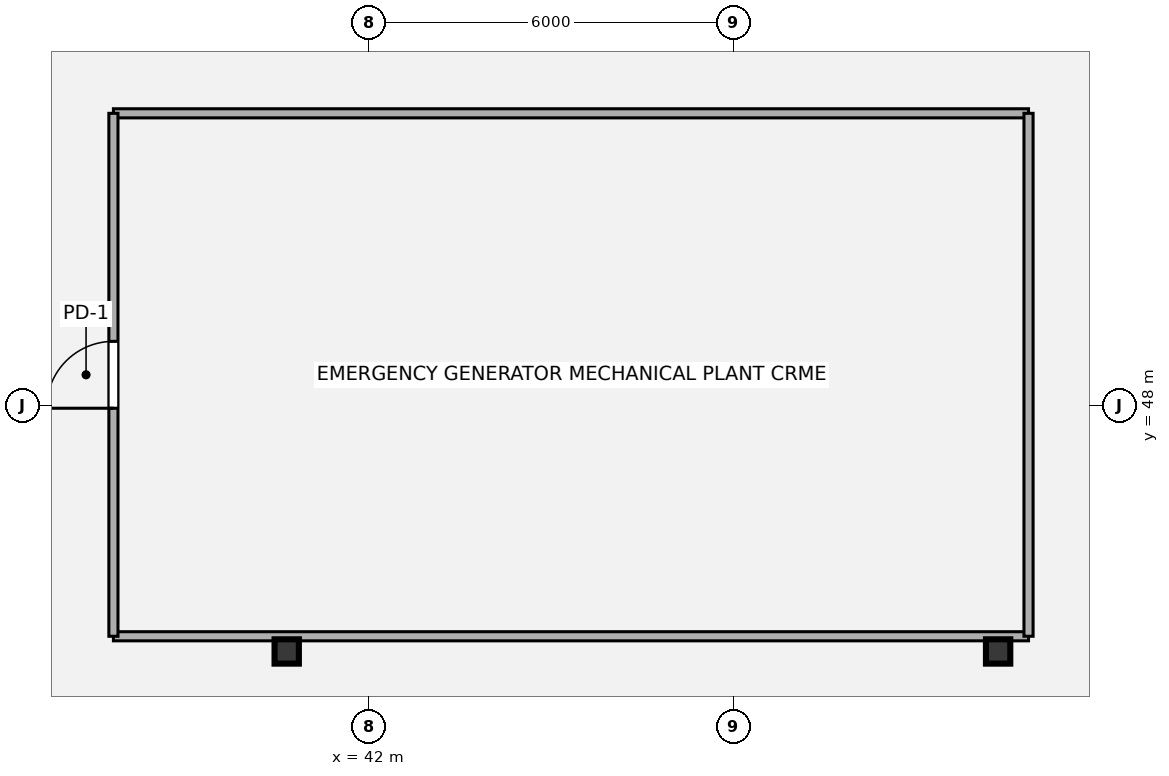
"""IFC4 building model, lengths in metres.
Left out: names, types, materials, properties, quantities, classifications, styles, units other than length and angle.
Written with IfcOpenShell. Run it as: python <this file> out.ifc"""

import sys

from ifc_helpers import new_model, si_unit, direction, frame, frame_2d, origin, origin_2d, place, context, subcontext, project, spatial, rectangle, hollow_rectangle, extrude, source, transform, mapped, element, fill, save


model = new_model("IFC4")
c1 = context("Model", 3, precision=1e-05, world=origin(), true_north=direction((0.0, 1.0)))
c2 = subcontext(c1, "Body", "Model", "MODEL_VIEW")
j1 = project(units=[si_unit("LENGTHUNIT", "METRE"), si_unit("PLANEANGLEUNIT", "RADIAN")], contexts=[c1])
p1 = place(None, origin())
s1 = spatial("IfcSite", under=j1, at=p1, CompositionType="ELEMENT")
p2 = place(p1, origin())
s2 = spatial("IfcBuilding", under=s1, at=p2, CompositionType="ELEMENT")
p3 = place(p2, frame((0.0, 0.0, 307.8)))
s3 = spatial("IfcBuildingStorey", under=s2, at=p3, CompositionType="ELEMENT", Elevation=307.8)
m1 = source(origin(), c2, "Body", "SweptSolid", [
    extrude(hollow_rectangle(XDim=0.4, YDim=0.4, WallThickness=0.02, OuterFilletRadius=0.04, at=origin_2d()), origin(), (0.0, 0.0, 1.0), 3.96),
])
for number, where, z_axis, x_axis in (
    (1, (52.35, 43.95, 0.0), (0.0, 0.0, 1.0), (1.0, 0.0, 0.0)),
    (2, (40.65, 43.95, 0.0), (0.0, 0.0, 1.0), (1.0, 0.0, 0.0)),
):
    element("IfcColumn", number, at=place(p3, frame(where, z_axis=z_axis, x_axis=x_axis)), inside=s3, PredefinedType="COLUMN", context=c2, shape_type="MappedRepresentation", body=[
        mapped(m1, transform((0.0, 0.0, 0.0), x_axis=(1.0, 0.0, 0.0), y_axis=(0.0, 1.0, 0.0), z_axis=(0.0, 0.0, 1.0), scale=1.0)),
    ])
p4 = place(p3, frame((54.05, 43.6, 0.0), z_axis=(0.0, 0.0, 1.0), x_axis=(-0.194979757801, -0.980807266515, 0.0)))
e3 = element("IfcWall", 3, at=p4, inside=s3, PredefinedType="SOLIDWALL", context=c2, shape_type="SweptSolid", body=[
    extrude(rectangle(XDim=0.702, YDim=0.195, at=frame_2d((0.351, 0.0))), origin(), (0.0, 0.0, 1.0), 3.71),
])
p5 = place(p3, frame((37.8, 44.2, 0.0), z_axis=(0.0, 0.0, 1.0), x_axis=(1.0, 0.0, 0.0)))
e4 = element("IfcWall", 4, at=p5, inside=s3, PredefinedType="PARTITIONING", context=c2, shape_type="SweptSolid", body=[
    extrude(rectangle(XDim=15.05, YDim=0.15, at=frame_2d((7.525, 0.0))), origin(), (0.0, 0.0, 1.0), 3.083),
])
p6 = place(p3, frame((37.8, 52.8, 0.0), z_axis=(0.0, 0.0, 1.0), x_axis=(1.0, 0.0, 0.0)))
e5 = element("IfcWall", 5, at=p6, inside=s3, PredefinedType="PARTITIONING", context=c2, shape_type="SweptSolid", body=[
    extrude(rectangle(XDim=15.05, YDim=0.15, at=frame_2d((7.525, 0.0))), origin(), (0.0, 0.0, 1.0), 3.162),
])
p7 = place(p3, frame((37.8, 44.2, 0.0), z_axis=(0.0, 0.0, 1.0), x_axis=(0.0, 1.0, 0.0)))
e6 = element("IfcWall", 6, at=p7, inside=s3, PredefinedType="PARTITIONING", context=c2, shape_type="SweptSolid", body=[
    extrude(rectangle(XDim=8.6, YDim=0.15, at=frame_2d((4.3, 0.0))), origin(), (0.0, 0.0, 1.0), 3.68),
])
p8 = place(p7, frame((3.75, 0.0, 0.0)))
e7 = element("IfcOpeningElement", 7, at=p8, cuts=e6, PredefinedType="OPENING", context=c2, shape_type="SweptSolid", body=[
    extrude(rectangle(XDim=1.1, YDim=2.1, at=origin_2d()), frame((0.55, 0.085, 1.05), z_axis=(0.0, -1.0, 0.0), x_axis=(1.0, 0.0, 0.0)), (0.0, 0.0, 1.0), 0.17),
])
p9 = place(p3, frame((52.85, 44.2, 0.0), z_axis=(0.0, 0.0, 1.0), x_axis=(0.0, 1.0, 0.0)))
e8 = element("IfcWall", 8, at=p9, inside=s3, PredefinedType="PARTITIONING", context=c2, shape_type="SweptSolid", body=[
    extrude(rectangle(XDim=8.6, YDim=0.15, at=frame_2d((4.3, 0.0))), origin(), (0.0, 0.0, 1.0), 3.68),
])
m2 = source(origin(), c2, "Body", "SweptSolid", [
    extrude(rectangle(XDim=1.1, YDim=2.1, at=origin_2d()), frame((0.55, 0.025, 1.05), z_axis=(0.0, -1.0, 0.0), x_axis=(1.0, 0.0, 0.0)), (0.0, 0.0, 1.0), 0.05),
])
p10 = place(p8, origin())
e9 = element("IfcDoor", 9, at=p10, inside=s3, OperationType="SINGLE_SWING_LEFT", PredefinedType="DOOR", context=c2, shape_type="MappedRepresentation", body=[
    mapped(m2, transform((0.0, 0.0, 0.0), x_axis=(1.0, 0.0, 0.0), y_axis=(0.0, 1.0, 0.0), z_axis=(0.0, 0.0, 1.0), scale=1.0)),
])
fill(e7, e9)
save(model, sys.argv[1])
